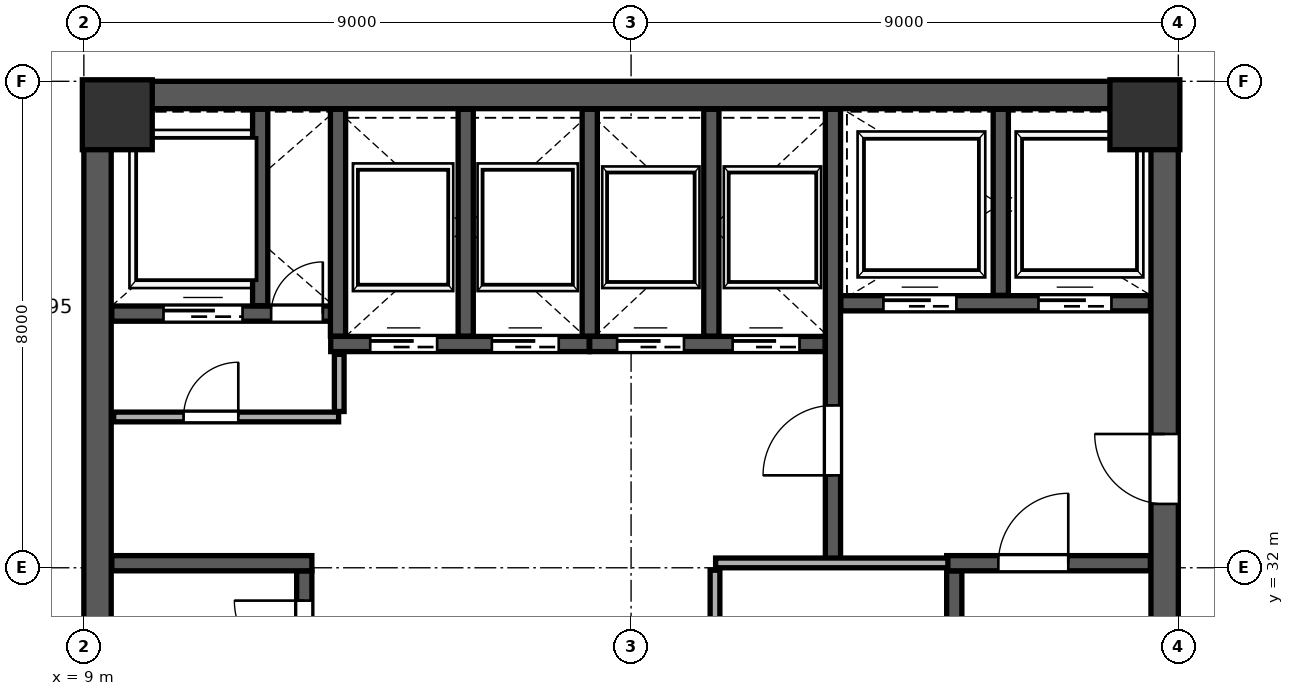
"""IFC4 building model, lengths in metres.
Left out: names, types, materials, properties, quantities, classifications, styles, units other than length and angle.
Written with IfcOpenShell. Run it as: python <this file> out.ifc"""

import sys

from ifc_helpers import new_model, si_unit, direction, frame, frame_2d, origin, origin_2d, place, context, subcontext, project, spatial, rectangle, extrude, source, transform, mapped, element, fill, save


model = new_model("IFC4")
c1 = context("Model", 3, precision=1e-05, world=origin(), true_north=direction((0.0, 1.0)))
c2 = subcontext(c1, "Body", "Model", "MODEL_VIEW")
j1 = project(units=[si_unit("LENGTHUNIT", "METRE"), si_unit("PLANEANGLEUNIT", "RADIAN")], contexts=[c1])
p1 = place(None, origin())
s1 = spatial("IfcSite", under=j1, at=p1, CompositionType="ELEMENT")
p2 = place(p1, origin())
s2 = spatial("IfcBuilding", under=s1, at=p2, CompositionType="ELEMENT")
p3 = place(p2, frame((0.0, 0.0, 127.6)))
s3 = spatial("IfcBuildingStorey", under=s2, at=p3, CompositionType="ELEMENT", Elevation=127.6)
m1 = source(origin(), c2, "Body", "SweptSolid", [
    extrude(rectangle(XDim=1.15, YDim=1.15, at=origin_2d()), origin(), (0.0, 0.0, 1.0), 5.398),
])
for number, where, z_axis, x_axis in (
    (1, (9.55, 39.45, 0.001), (0.0, 0.0, 1.0), (1.0, 0.0, 0.0)),
    (2, (26.45, 39.45, 0.001), (0.0, 0.0, 1.0), (1.0, 0.0, 0.0)),
):
    element("IfcColumn", number, at=place(p3, frame(where, z_axis=z_axis, x_axis=x_axis)), inside=s3, PredefinedType="COLUMN", context=c2, shape_type="MappedRepresentation", body=[
        mapped(m1, transform((0.0, 0.0, 0.0), scale=1.0)),
    ])
p4 = place(p3, frame((9.225, 24.45, 0.0), z_axis=(0.0, 0.0, 1.0), x_axis=(0.0, 1.0, 0.0)))
e3 = element("IfcWall", 3, at=p4, inside=s3, PredefinedType="SHEAR", context=c2, shape_type="SweptSolid", body=[
    extrude(rectangle(XDim=15.1, YDim=0.45, at=frame_2d((7.55, 0.0))), origin(), (0.0, 0.0, 1.0), 5.16),
])
p5 = place(p3, frame((26.775, 24.45, 0.0), z_axis=(0.0, 0.0, 1.0), x_axis=(0.0, 1.0, 0.0)))
e4 = element("IfcWall", 4, at=p5, inside=s3, PredefinedType="SHEAR", context=c2, shape_type="SweptSolid", body=[
    extrude(rectangle(XDim=15.1, YDim=0.45, at=frame_2d((7.55, 0.0))), origin(), (0.0, 0.0, 1.0), 5.16),
])
p6 = place(p5, frame((8.6, 0.0, 0.0)))
e5 = element("IfcOpeningElement", 5, at=p6, cuts=e4, PredefinedType="OPENING", context=c2, shape_type="SweptSolid", body=[
    extrude(rectangle(XDim=1.15, YDim=2.2, at=frame_2d((0.575, 1.1))), frame((0.0, 0.235, 0.0), z_axis=(0.0, -1.0, 0.0), x_axis=(1.0, 0.0, 0.0)), (0.0, 0.0, 1.0), 0.47),
])
p7 = place(p3, frame((9.0, 39.775, 0.0), z_axis=(0.0, 0.0, 1.0), x_axis=(1.0, 0.0, 0.0)))
e6 = element("IfcWall", 6, at=p7, inside=s3, PredefinedType="SHEAR", context=c2, shape_type="SweptSolid", body=[
    extrude(rectangle(XDim=18.0, YDim=0.45, at=frame_2d((9.0, 0.0))), origin(), (0.0, 0.0, 1.0), 5.16),
])
p8 = place(p3, frame((12.625, 24.46, 0.0), z_axis=(0.0, 0.0, 1.0), x_axis=(0.0, 1.0, 0.0)))
e7 = element("IfcWall", 7, at=p8, inside=s3, PredefinedType="SHEAR", context=c2, shape_type="SweptSolid", body=[
    extrude(rectangle(XDim=7.49, YDim=0.25, at=frame_2d((3.745, 0.0))), origin(), (0.0, 0.0, 1.0), 5.16),
])
p9 = place(p8, frame((5.85, 0.0, 0.0)))
e8 = element("IfcOpeningElement", 8, at=p9, cuts=e7, PredefinedType="OPENING", context=c2, shape_type="SweptSolid", body=[
    extrude(rectangle(XDim=1.15, YDim=2.2, at=frame_2d((0.575, 1.1))), frame((0.0, 0.135, 0.0), z_axis=(0.0, -1.0, 0.0), x_axis=(1.0, 0.0, 0.0)), (0.0, 0.0, 1.0), 0.27),
])
p10 = place(p3, frame((9.46, 32.075, 0.0), z_axis=(0.0, 0.0, 1.0), x_axis=(1.0, 0.0, 0.0)))
e9 = element("IfcWall", 9, at=p10, inside=s3, PredefinedType="SHEAR", context=c2, shape_type="SweptSolid", body=[
    extrude(rectangle(XDim=3.29, YDim=0.25, at=frame_2d((1.645, 0.0))), origin(), (0.0, 0.0, 1.0), 5.16),
])
p11 = place(p3, frame((23.315, 24.46, 0.0), z_axis=(0.0, 0.0, 1.0), x_axis=(0.0, 1.0, 0.0)))
e10 = element("IfcWall", 10, at=p11, inside=s3, PredefinedType="SHEAR", context=c2, shape_type="SweptSolid", body=[
    extrude(rectangle(XDim=7.49, YDim=0.25, at=frame_2d((3.745, 0.0))), origin(), (0.0, 0.0, 1.0), 5.16),
])
p12 = place(p3, frame((23.19, 32.075, 0.0), z_axis=(0.0, 0.0, 1.0), x_axis=(1.0, 0.0, 0.0)))
e11 = element("IfcWall", 11, at=p12, inside=s3, PredefinedType="SHEAR", context=c2, shape_type="SweptSolid", body=[
    extrude(rectangle(XDim=3.35, YDim=0.25, at=frame_2d((1.675, 0.0))), origin(), (0.0, 0.0, 1.0), 5.16),
])
p13 = place(p12, frame((0.85, 0.0, 0.0)))
e12 = element("IfcOpeningElement", 12, at=p13, cuts=e11, PredefinedType="OPENING", context=c2, shape_type="SweptSolid", body=[
    extrude(rectangle(XDim=1.15, YDim=2.2, at=frame_2d((0.575, 1.1))), frame((0.0, 0.135, 0.0), z_axis=(0.0, -1.0, 0.0), x_axis=(1.0, 0.0, 0.0)), (0.0, 0.0, 1.0), 0.27),
])
p14 = place(p3, frame((21.32, 32.12, 0.0), z_axis=(0.0, 0.0, 1.0), x_axis=(0.0, 1.0, 0.0)))
e13 = element("IfcWall", 13, at=p14, inside=s3, PredefinedType="SHEAR", context=c2, shape_type="SweptSolid", body=[
    extrude(rectangle(XDim=7.42, YDim=0.25, at=frame_2d((3.71, 0.0))), origin(), (0.0, 0.0, 1.0), 5.16),
])
p15 = place(p14, frame((1.4, 0.0, 0.0)))
e14 = element("IfcOpeningElement", 14, at=p15, cuts=e13, PredefinedType="OPENING", context=c2, shape_type="SweptSolid", body=[
    extrude(rectangle(XDim=1.15, YDim=2.2, at=frame_2d((0.575, 1.1))), frame((0.0, 0.135, 0.0), z_axis=(0.0, -1.0, 0.0), x_axis=(1.0, 0.0, 0.0)), (0.0, 0.0, 1.0), 0.27),
])
p16 = place(p3, frame((9.46, 36.18, 0.0), z_axis=(0.0, 0.0, 1.0), x_axis=(1.0, 0.0, 0.0)))
e15 = element("IfcWall", 15, at=p16, inside=s3, PredefinedType="SHEAR", context=c2, shape_type="SweptSolid", body=[
    extrude(rectangle(XDim=3.79, YDim=0.25, at=frame_2d((1.895, 0.0))), origin(), (0.0, 0.0, 1.0), 5.16),
])
p17 = place(p16, frame((2.62, 0.0, 0.0)))
e16 = element("IfcOpeningElement", 16, at=p17, cuts=e15, PredefinedType="OPENING", context=c2, shape_type="SweptSolid", body=[
    extrude(rectangle(XDim=0.85, YDim=2.1, at=frame_2d((0.425, 1.05))), frame((0.0, 0.135, 0.0), z_axis=(0.0, -1.0, 0.0), x_axis=(1.0, 0.0, 0.0)), (0.0, 0.0, 1.0), 0.27),
])
p18 = place(p16, frame((0.85, 0.0, 0.0)))
e17 = element("IfcOpeningElement", 17, at=p18, cuts=e15, PredefinedType="OPENING", context=c2, shape_type="SweptSolid", body=[
    extrude(rectangle(XDim=1.3, YDim=2.25, at=frame_2d((0.65, 1.125))), frame((0.0, 0.135, 0.0), z_axis=(0.0, -1.0, 0.0), x_axis=(1.0, 0.0, 0.0)), (0.0, 0.0, 1.0), 0.27),
])
p19 = place(p3, frame((11.9, 36.31, 0.0), z_axis=(0.0, 0.0, 1.0), x_axis=(0.0, 1.0, 0.0)))
e18 = element("IfcWall", 18, at=p19, inside=s3, PredefinedType="SHEAR", context=c2, shape_type="SweptSolid", body=[
    extrude(rectangle(XDim=3.23, YDim=0.25, at=frame_2d((1.615, 0.0))), origin(), (0.0, 0.0, 1.0), 5.16),
])
p20 = place(p3, frame((21.45, 36.35, 0.0), z_axis=(0.0, 0.0, 1.0), x_axis=(1.0, 0.0, 0.0)))
e19 = element("IfcWall", 19, at=p20, inside=s3, PredefinedType="SHEAR", context=c2, shape_type="SweptSolid", body=[
    extrude(rectangle(XDim=5.09, YDim=0.25, at=frame_2d((2.545, 0.0))), origin(), (0.0, 0.0, 1.0), 5.16),
])
p21 = place(p20, frame((0.7, 0.0, 0.0)))
e20 = element("IfcOpeningElement", 20, at=p21, cuts=e19, PredefinedType="OPENING", context=c2, shape_type="SweptSolid", body=[
    extrude(rectangle(XDim=1.2, YDim=2.2, at=frame_2d((0.6, 1.1))), frame((0.0, 0.135, 0.0), z_axis=(0.0, -1.0, 0.0), x_axis=(1.0, 0.0, 0.0)), (0.0, 0.0, 1.0), 0.27),
])
p22 = place(p20, frame((3.25, 0.0, 0.0)))
e21 = element("IfcOpeningElement", 21, at=p22, cuts=e19, PredefinedType="OPENING", context=c2, shape_type="SweptSolid", body=[
    extrude(rectangle(XDim=1.2, YDim=2.2, at=frame_2d((0.6, 1.1))), frame((0.0, 0.135, 0.0), z_axis=(0.0, -1.0, 0.0), x_axis=(1.0, 0.0, 0.0)), (0.0, 0.0, 1.0), 0.27),
])
p23 = place(p3, frame((24.08, 36.48, 0.0), z_axis=(0.0, 0.0, 1.0), x_axis=(0.0, 1.0, 0.0)))
e22 = element("IfcWall", 22, at=p23, inside=s3, PredefinedType="SHEAR", context=c2, shape_type="SweptSolid", body=[
    extrude(rectangle(XDim=3.06, YDim=0.25, at=frame_2d((1.53, 0.0))), origin(), (0.0, 0.0, 1.0), 5.16),
])
p24 = place(p3, frame((13.06, 35.68, 0.0), z_axis=(0.0, 0.0, 1.0), x_axis=(1.0, 0.0, 0.0)))
e23 = element("IfcWall", 23, at=p24, inside=s3, PredefinedType="SHEAR", context=c2, shape_type="SweptSolid", body=[
    extrude(rectangle(XDim=4.25, YDim=0.25, at=frame_2d((2.125, 0.0))), origin(), (0.0, 0.0, 1.0), 5.16),
])
p25 = place(p24, frame((0.65, 0.0, 0.0)))
e24 = element("IfcOpeningElement", 24, at=p25, cuts=e23, PredefinedType="OPENING", context=c2, shape_type="SweptSolid", body=[
    extrude(rectangle(XDim=1.1, YDim=2.2, at=frame_2d((0.55, 1.1))), frame((0.0, 0.135, 0.0), z_axis=(0.0, -1.0, 0.0), x_axis=(1.0, 0.0, 0.0)), (0.0, 0.0, 1.0), 0.27),
])
p26 = place(p24, frame((2.65, 0.0, 0.0)))
e25 = element("IfcOpeningElement", 25, at=p26, cuts=e23, PredefinedType="OPENING", context=c2, shape_type="SweptSolid", body=[
    extrude(rectangle(XDim=1.1, YDim=2.2, at=frame_2d((0.55, 1.1))), frame((0.0, 0.135, 0.0), z_axis=(0.0, -1.0, 0.0), x_axis=(1.0, 0.0, 0.0)), (0.0, 0.0, 1.0), 0.27),
])
for number, where, z_axis, x_axis in (
    (26, (13.18, 35.81, 0.0), (0.0, 0.0, 1.0), (0.0, 1.0, 0.0)),
    (27, (15.28, 35.81, 0.0), (0.0, 0.0, 1.0), (0.0, 1.0, 0.0)),
):
    element("IfcWall", number, at=place(p3, frame(where, z_axis=z_axis, x_axis=x_axis)), inside=s3, PredefinedType="SHEAR", context=c2, shape_type="SweptSolid", body=[
        extrude(rectangle(XDim=3.73, YDim=0.25, at=frame_2d((1.865, 0.0))), origin(), (0.0, 0.0, 1.0), 5.16),
    ])
p27 = place(p3, frame((17.32, 35.68, 0.0), z_axis=(0.0, 0.0, 1.0), x_axis=(1.0, 0.0, 0.0)))
e28 = element("IfcWall", 28, at=p27, inside=s3, PredefinedType="SHEAR", context=c2, shape_type="SweptSolid", body=[
    extrude(rectangle(XDim=3.87, YDim=0.25, at=frame_2d((1.935, 0.0))), origin(), (0.0, 0.0, 1.0), 5.16),
])
p28 = place(p27, frame((0.45, 0.0, 0.0)))
e29 = element("IfcOpeningElement", 29, at=p28, cuts=e28, PredefinedType="OPENING", context=c2, shape_type="SweptSolid", body=[
    extrude(rectangle(XDim=1.1, YDim=2.2, at=frame_2d((0.55, 1.1))), frame((0.0, 0.135, 0.0), z_axis=(0.0, -1.0, 0.0), x_axis=(1.0, 0.0, 0.0)), (0.0, 0.0, 1.0), 0.27),
])
p29 = place(p27, frame((2.35, 0.0, 0.0)))
e30 = element("IfcOpeningElement", 30, at=p29, cuts=e28, PredefinedType="OPENING", context=c2, shape_type="SweptSolid", body=[
    extrude(rectangle(XDim=1.1, YDim=2.2, at=frame_2d((0.55, 1.1))), frame((0.0, 0.135, 0.0), z_axis=(0.0, -1.0, 0.0), x_axis=(1.0, 0.0, 0.0)), (0.0, 0.0, 1.0), 0.27),
])
for number, where, z_axis, x_axis in (
    (31, (17.32, 35.81, 0.0), (0.0, 0.0, 1.0), (0.0, 1.0, 0.0)),
    (32, (19.32, 35.81, 0.0), (0.0, 0.0, 1.0), (0.0, 1.0, 0.0)),
):
    element("IfcWall", number, at=place(p3, frame(where, z_axis=z_axis, x_axis=x_axis)), inside=s3, PredefinedType="SHEAR", context=c2, shape_type="SweptSolid", body=[
        extrude(rectangle(XDim=3.73, YDim=0.25, at=frame_2d((1.865, 0.0))), origin(), (0.0, 0.0, 1.0), 5.16),
    ])
p30 = place(p3, frame((9.49, 34.48, 0.0), z_axis=(0.0, 0.0, 1.0), x_axis=(1.0, 0.0, 0.0)))
e33 = element("IfcWall", 33, at=p30, inside=s3, PredefinedType="PARTITIONING", context=c2, shape_type="SweptSolid", body=[
    extrude(rectangle(XDim=3.7, YDim=0.16, at=frame_2d((1.85, 0.0))), origin(), (0.0, 0.0, 1.0), 5.16),
])
p31 = place(p30, frame((1.15, 0.0, 0.0)))
e34 = element("IfcOpeningElement", 34, at=p31, cuts=e33, PredefinedType="OPENING", context=c2, shape_type="SweptSolid", body=[
    extrude(rectangle(XDim=0.9, YDim=2.15, at=frame_2d((0.45, 1.075))), frame((0.0, 0.09, 0.0), z_axis=(0.0, -1.0, 0.0), x_axis=(1.0, 0.0, 0.0)), (0.0, 0.0, 1.0), 0.18),
])
p32 = place(p3, frame((13.2, 34.57, 0.0), z_axis=(0.0, 0.0, 1.0), x_axis=(0.0, 1.0, 0.0)))
e35 = element("IfcWall", 35, at=p32, inside=s3, PredefinedType="PARTITIONING", context=c2, shape_type="SweptSolid", body=[
    extrude(rectangle(XDim=0.94, YDim=0.16, at=frame_2d((0.47, 0.0))), origin(), (0.0, 0.0, 1.0), 5.16),
])
p33 = place(p3, frame((19.39, 32.08, 0.0), z_axis=(0.0, 0.0, 1.0), x_axis=(1.0, 0.0, 0.0)))
e36 = element("IfcWall", 36, at=p33, inside=s3, PredefinedType="PARTITIONING", context=c2, shape_type="SweptSolid", body=[
    extrude(rectangle(XDim=3.82, YDim=0.16, at=frame_2d((1.91, 0.0))), origin(), (0.0, 0.0, 1.0), 5.16),
])
p34 = place(p3, frame((19.38, 28.29, 0.0), z_axis=(0.0, 0.0, 1.0), x_axis=(0.0, 1.0, 0.0)))
e37 = element("IfcWall", 37, at=p34, inside=s3, PredefinedType="PARTITIONING", context=c2, shape_type="SweptSolid", body=[
    extrude(rectangle(XDim=3.67, YDim=0.16, at=frame_2d((1.835, 0.0))), origin(), (0.0, 0.0, 1.0), 5.16),
])
p35 = place(p34, frame((1.5, 0.0, 0.0)))
e38 = element("IfcOpeningElement", 38, at=p35, cuts=e37, PredefinedType="OPENING", context=c2, shape_type="SweptSolid", body=[
    extrude(rectangle(XDim=0.85, YDim=2.1, at=frame_2d((0.425, 1.05))), frame((0.0, 0.09, 0.0), z_axis=(0.0, -1.0, 0.0), x_axis=(1.0, 0.0, 0.0)), (0.0, 0.0, 1.0), 0.18),
])
p36 = place(p3, frame((9.432, 47.992, 0.0), z_axis=(0.0, 0.0, 1.0), x_axis=(0.939693422468, -0.342017940715, 0.0)))
e39 = element("IfcWall", 39, at=p36, inside=s3, PredefinedType="PARTITIONING", context=c2, shape_type="SweptSolid", body=[
    extrude(rectangle(XDim=26.67, YDim=0.135, at=frame_2d((13.335, 0.0))), origin(), (0.0, 0.0, 1.0), 5.16),
])
p37 = place(p36, frame((1.05, 0.0, 0.0)))
e40 = element("IfcOpeningElement", 40, at=p37, cuts=e39, PredefinedType="OPENING", context=c2, shape_type="SweptSolid", body=[
    extrude(rectangle(XDim=0.95, YDim=2.15, at=frame_2d((0.475, 1.075))), frame((0.0, 0.078, 0.0), z_axis=(0.0, -1.0, 0.0), x_axis=(1.0, 0.0, 0.0)), (0.0, 0.0, 1.0), 0.155),
])
p38 = place(p3, frame((0.861, 24.56, 0.0), z_axis=(0.0, 0.0, 1.0), x_axis=(0.342022409736, 0.939691795877, 0.0)))
e41 = element("IfcWall", 41, at=p38, inside=s3, PredefinedType="PARTITIONING", context=c2, shape_type="SweptSolid", body=[
    extrude(rectangle(XDim=24.91, YDim=0.1, at=frame_2d((12.455, 0.0))), origin(), (0.0, 0.0, 1.0), 4.395),
])
p39 = place(p38, frame((3.0, 0.0, 0.0)))
e42 = element("IfcOpeningElement", 42, at=p39, cuts=e41, PredefinedType="OPENING", context=c2, shape_type="SweptSolid", body=[
    extrude(rectangle(XDim=0.95, YDim=2.15, at=frame_2d((0.475, 1.075))), frame((0.0, 0.06, 0.0), z_axis=(0.0, -1.0, 0.0), x_axis=(1.0, 0.0, 0.0)), (0.0, 0.0, 1.0), 0.12),
])
m2 = source(origin(), c2, "Body", "SweptSolid", [
    extrude(rectangle(XDim=1.15, YDim=2.2, at=frame_2d((0.575, 1.1))), frame((0.0, 0.025, 0.0), z_axis=(0.0, -1.0, 0.0), x_axis=(1.0, 0.0, 0.0)), (0.0, 0.0, 1.0), 0.05),
])
p40 = place(p9, origin())
e43 = element("IfcDoor", 43, at=p40, inside=s3, OperationType="SINGLE_SWING_RIGHT", PredefinedType="DOOR", context=c2, shape_type="MappedRepresentation", body=[
    mapped(m2, transform((0.0, 0.0, 0.0), scale=1.0)),
])
fill(e8, e43)
m3 = source(origin(), c2, "Body", "SweptSolid", [
    extrude(rectangle(XDim=1.15, YDim=2.2, at=frame_2d((0.575, 1.1))), frame((0.0, 0.025, 0.0), z_axis=(0.0, -1.0, 0.0), x_axis=(1.0, 0.0, 0.0)), (0.0, 0.0, 1.0), 0.05),
])
p41 = place(p15, origin())
e44 = element("IfcDoor", 44, at=p41, inside=s3, OperationType="SINGLE_SWING_LEFT", PredefinedType="DOOR", context=c2, shape_type="MappedRepresentation", body=[
    mapped(m3, transform((0.0, 0.0, 0.0), scale=1.0)),
])
fill(e14, e44)
p42 = place(p13, origin())
e45 = element("IfcDoor", 45, at=p42, inside=s3, OperationType="SINGLE_SWING_RIGHT", PredefinedType="DOOR", context=c2, shape_type="MappedRepresentation", body=[
    mapped(m2, transform((0.0, 0.0, 0.0), scale=1.0)),
])
fill(e12, e45)
p43 = place(p6, origin())
e46 = element("IfcDoor", 46, at=p43, inside=s3, OperationType="SINGLE_SWING_RIGHT", PredefinedType="DOOR", context=c2, shape_type="MappedRepresentation", body=[
    mapped(m3, transform((0.0, 0.0, 0.0), scale=1.0)),
])
fill(e5, e46)
m4 = source(origin(), c2, "Body", "SweptSolid", [
    extrude(rectangle(XDim=0.85, YDim=2.1, at=frame_2d((0.425, 1.05))), frame((0.0, 0.025, 0.0), z_axis=(0.0, -1.0, 0.0), x_axis=(1.0, 0.0, 0.0)), (0.0, 0.0, 1.0), 0.05),
])
p44 = place(p17, origin())
e47 = element("IfcDoor", 47, at=p44, inside=s3, OperationType="SINGLE_SWING_RIGHT", PredefinedType="DOOR", context=c2, shape_type="MappedRepresentation", body=[
    mapped(m4, transform((0.0, 0.0, 0.0), scale=1.0)),
])
fill(e16, e47)
m5 = source(origin(), c2, "Body", "SweptSolid", [
    extrude(rectangle(XDim=1.1, YDim=2.2, at=frame_2d((0.55, 1.1))), frame((0.0, 0.025, 0.0), z_axis=(0.0, -1.0, 0.0), x_axis=(1.0, 0.0, 0.0)), (0.0, 0.0, 1.0), 0.05),
])
p45 = place(p25, origin())
e48 = element("IfcDoor", 48, at=p45, inside=s3, OperationType="SLIDING_TO_LEFT", PredefinedType="DOOR", context=c2, shape_type="MappedRepresentation", body=[
    mapped(m5, transform((0.0, 0.0, 0.0), scale=1.0)),
])
fill(e24, e48)
p46 = place(p26, origin())
e49 = element("IfcDoor", 49, at=p46, inside=s3, OperationType="SLIDING_TO_RIGHT", PredefinedType="DOOR", context=c2, shape_type="MappedRepresentation", body=[
    mapped(m5, transform((0.0, 0.0, 0.0), scale=1.0)),
])
fill(e25, e49)
p47 = place(p28, origin())
e50 = element("IfcDoor", 50, at=p47, inside=s3, OperationType="SLIDING_TO_LEFT", PredefinedType="DOOR", context=c2, shape_type="MappedRepresentation", body=[
    mapped(m5, transform((0.0, 0.0, 0.0), scale=1.0)),
])
fill(e29, e50)
p48 = place(p29, origin())
e51 = element("IfcDoor", 51, at=p48, inside=s3, OperationType="SLIDING_TO_RIGHT", PredefinedType="DOOR", context=c2, shape_type="MappedRepresentation", body=[
    mapped(m5, transform((0.0, 0.0, 0.0), scale=1.0)),
])
fill(e30, e51)
m6 = source(origin(), c2, "Body", "SweptSolid", [
    extrude(rectangle(XDim=1.2, YDim=2.2, at=frame_2d((0.6, 1.1))), frame((0.0, 0.025, 0.0), z_axis=(0.0, -1.0, 0.0), x_axis=(1.0, 0.0, 0.0)), (0.0, 0.0, 1.0), 0.05),
])
p49 = place(p21, origin())
e52 = element("IfcDoor", 52, at=p49, inside=s3, OperationType="SLIDING_TO_LEFT", PredefinedType="DOOR", context=c2, shape_type="MappedRepresentation", body=[
    mapped(m6, transform((0.0, 0.0, 0.0), scale=1.0)),
])
fill(e20, e52)
p50 = place(p22, origin())
e53 = element("IfcDoor", 53, at=p50, inside=s3, OperationType="SLIDING_TO_RIGHT", PredefinedType="DOOR", context=c2, shape_type="MappedRepresentation", body=[
    mapped(m6, transform((0.0, 0.0, 0.0), scale=1.0)),
])
fill(e21, e53)
m7 = source(origin(), c2, "Body", "SweptSolid", [
    extrude(rectangle(XDim=1.3, YDim=2.25, at=frame_2d((0.65, 1.125))), frame((0.0, 0.025, 0.0), z_axis=(0.0, -1.0, 0.0), x_axis=(1.0, 0.0, 0.0)), (0.0, 0.0, 1.0), 0.05),
])
p51 = place(p18, origin())
e54 = element("IfcDoor", 54, at=p51, inside=s3, OperationType="SLIDING_TO_LEFT", PredefinedType="DOOR", context=c2, shape_type="MappedRepresentation", body=[
    mapped(m7, transform((0.0, 0.0, 0.0), scale=1.0)),
])
fill(e17, e54)
m8 = source(origin(), c2, "Body", "SweptSolid", [
    extrude(rectangle(XDim=0.9, YDim=2.15, at=frame_2d((0.45, 1.075))), frame((0.0, 0.025, 0.0), z_axis=(0.0, -1.0, 0.0), x_axis=(1.0, 0.0, 0.0)), (0.0, 0.0, 1.0), 0.05),
])
p52 = place(p31, origin())
e55 = element("IfcDoor", 55, at=p52, inside=s3, OperationType="SINGLE_SWING_RIGHT", PredefinedType="DOOR", context=c2, shape_type="MappedRepresentation", body=[
    mapped(m8, transform((0.0, 0.0, 0.0), scale=1.0)),
])
fill(e34, e55)
save(model, sys.argv[1])
